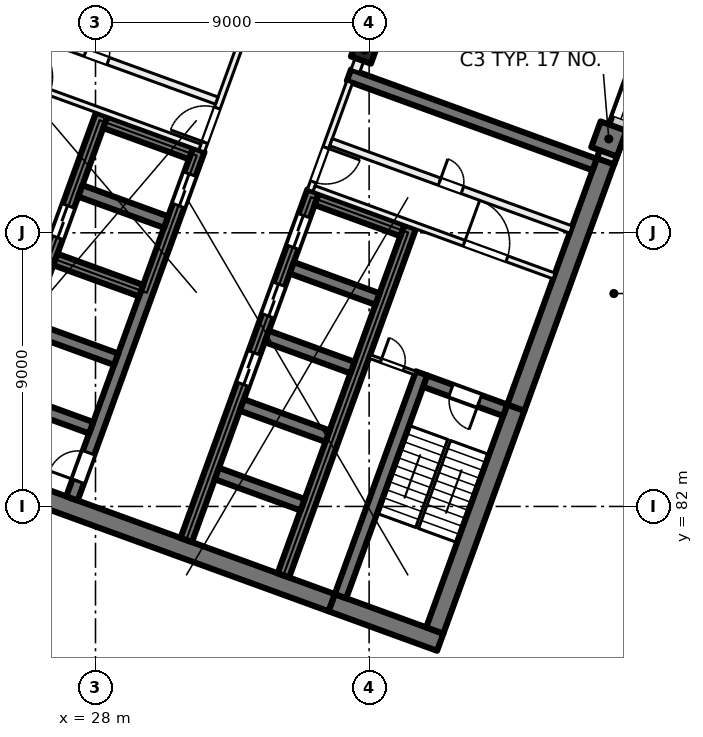
"""IFC4 building model, lengths in metres.
Left out: names, types, materials, properties, quantities, classifications, styles, units other than length and angle.
Written with IfcOpenShell. Run it as: python <this file> out.ifc"""

import sys

from ifc_helpers import new_model, si_unit, direction, frame, frame_2d, origin, origin_2d, place, context, subcontext, project, spatial, rectangle, extrude, element, fill, save


model = new_model("IFC4")
c1 = context("Model", 3, precision=1e-05, world=origin(), true_north=direction((0.0, 1.0)))
c2 = subcontext(c1, "Body", "Model", "MODEL_VIEW")
j1 = project(units=[si_unit("LENGTHUNIT", "METRE"), si_unit("PLANEANGLEUNIT", "RADIAN")], contexts=[c1])
p1 = place(None, origin())
s1 = spatial("IfcSite", under=j1, at=p1, CompositionType="ELEMENT")
p2 = place(p1, origin())
s2 = spatial("IfcBuilding", under=s1, at=p2, CompositionType="ELEMENT")
p3 = place(p2, frame((0.0, 0.0, 47.5)))
s3 = spatial("IfcBuildingStorey", under=s2, at=p3, CompositionType="ELEMENT", Elevation=47.5)
p4 = place(p3, frame((36.849, 97.011, 0.0), z_axis=(0.0, 0.0, 1.0), x_axis=(-0.342020143326, -0.939692620786, 0.0)))
e1 = element("IfcColumn", 1, at=p4, inside=s3, PredefinedType="COLUMN", context=c2, shape_type="SweptSolid", body=[
    extrude(rectangle(XDim=0.7, YDim=0.7, at=origin_2d()), origin(), (0.0, 0.0, 1.0), 4.0),
])
p5 = place(p3, frame((44.884, 94.087, 0.0), z_axis=(0.0, 0.0, 1.0), x_axis=(-0.342020143326, -0.939692620786, 0.0)))
e2 = element("IfcColumn", 2, at=p5, inside=s3, PredefinedType="COLUMN", context=c2, shape_type="SweptSolid", body=[
    extrude(rectangle(XDim=0.9, YDim=0.9, at=origin_2d()), origin(), (0.0, 0.0, 1.0), 4.0),
])
p6 = place(p3, frame((39.338, 77.535, 0.0), z_axis=(0.0, 0.0, 1.0), x_axis=(-0.939701471648, 0.341995824804, 0.0)))
e3 = element("IfcWall", 3, at=p6, inside=s3, PredefinedType="SHEAR", context=c2, shape_type="SweptSolid", body=[
    extrude(rectangle(XDim=3.8, YDim=0.6, at=frame_2d((1.9, 0.0))), origin(), (0.0, 0.0, 1.0), 4.0),
])
p7 = place(p3, frame((35.767, 78.835, 0.0), z_axis=(0.0, 0.0, 1.0), x_axis=(-0.939692894512, 0.342019391267, 0.0)))
e4 = element("IfcWall", 4, at=p7, inside=s3, PredefinedType="SHEAR", context=c2, shape_type="SweptSolid", body=[
    extrude(rectangle(XDim=14.4, YDim=0.6, at=frame_2d((7.2, 0.0))), origin(), (0.0, 0.0, 1.0), 4.0),
])
p8 = place(p3, frame((39.159, 77.92, 0.0), z_axis=(0.0, 0.0, 1.0), x_axis=(0.342016982193, 0.939693771338, 0.0)))
e5 = element("IfcWall", 5, at=p8, inside=s3, PredefinedType="SHEAR", context=c2, shape_type="SweptSolid", body=[
    extrude(rectangle(XDim=7.8, YDim=0.6, at=frame_2d((3.9, 0.0))), origin(), (0.0, 0.0, 1.0), 4.0),
])
p9 = place(p3, frame((41.827, 85.249, 0.0), z_axis=(0.0, 0.0, 1.0), x_axis=(0.342016162452, 0.939694069696, 0.0)))
e6 = element("IfcWall", 6, at=p9, inside=s3, PredefinedType="SHEAR", context=c2, shape_type="SweptSolid", body=[
    extrude(rectangle(XDim=8.9, YDim=0.6, at=frame_2d((4.45, 0.0))), origin(), (0.0, 0.0, 1.0), 4.0),
])
p10 = place(p3, frame((36.058, 79.048, 0.0), z_axis=(0.0, 0.0, 1.0), x_axis=(0.342016982193, 0.939693771338, 0.0)))
e7 = element("IfcWall", 7, at=p10, inside=s3, PredefinedType="SHEAR", context=c2, shape_type="SweptSolid", body=[
    extrude(rectangle(XDim=7.8, YDim=0.4, at=frame_2d((3.9, 0.0))), origin(), (0.0, 0.0, 1.0), 4.0),
])
p11 = place(p3, frame((41.476, 85.164, 0.0), z_axis=(0.0, 0.0, 1.0), x_axis=(-0.939678810556, 0.342058084236, 0.0)))
e8 = element("IfcWall", 8, at=p11, inside=s3, PredefinedType="SHEAR", context=c2, shape_type="SweptSolid", body=[
    extrude(rectangle(XDim=2.8, YDim=0.4, at=frame_2d((1.4, 0.0))), origin(), (0.0, 0.0, 1.0), 4.0),
])
p12 = place(p11, frame((0.9, 0.0, 0.0)))
e9 = element("IfcOpeningElement", 9, at=p12, cuts=e8, PredefinedType="OPENING", context=c2, shape_type="SweptSolid", body=[
    extrude(rectangle(XDim=1.0, YDim=2.1, at=frame_2d((0.5, 1.05))), frame((0.0, 0.21, 0.0), z_axis=(0.0, -1.0, 0.0), x_axis=(1.0, 0.0, 0.0)), (0.0, 0.0, 1.0), 0.42),
])
p13 = place(p3, frame((30.984, 80.895, 0.0), z_axis=(0.0, 0.0, 1.0), x_axis=(0.342021021735, 0.939692301071, 0.0)))
e10 = element("IfcWall", 10, at=p13, inside=s3, PredefinedType="SHEAR", context=c2, shape_type="SweptSolid", body=[
    extrude(rectangle(XDim=12.2, YDim=0.4, at=frame_2d((6.1, 0.0))), origin(), (0.0, 0.0, 1.0), 4.0),
])
p14 = place(p13, frame((5.45, 0.0, 0.0)))
e11 = element("IfcOpeningElement", 11, at=p14, cuts=e10, PredefinedType="OPENING", context=c2, shape_type="SweptSolid", body=[
    extrude(rectangle(XDim=1.1, YDim=2.1, at=frame_2d((0.55, 1.05))), frame((0.0, 0.21, 0.0), z_axis=(0.0, -1.0, 0.0), x_axis=(1.0, 0.0, 0.0)), (0.0, 0.0, 1.0), 0.42),
])
p15 = place(p13, frame((7.85, 0.0, 0.0)))
e12 = element("IfcOpeningElement", 12, at=p15, cuts=e10, PredefinedType="OPENING", context=c2, shape_type="SweptSolid", body=[
    extrude(rectangle(XDim=1.1, YDim=2.1, at=frame_2d((0.55, 1.05))), frame((0.0, 0.21, 0.0), z_axis=(0.0, -1.0, 0.0), x_axis=(1.0, 0.0, 0.0)), (0.0, 0.0, 1.0), 0.42),
])
p16 = place(p13, frame((10.25, 0.0, 0.0)))
e13 = element("IfcOpeningElement", 13, at=p16, cuts=e10, PredefinedType="OPENING", context=c2, shape_type="SweptSolid", body=[
    extrude(rectangle(XDim=1.1, YDim=2.1, at=frame_2d((0.55, 1.05))), frame((0.0, 0.21, 0.0), z_axis=(0.0, -1.0, 0.0), x_axis=(1.0, 0.0, 0.0)), (0.0, 0.0, 1.0), 0.42),
])
p17 = place(p3, frame((34.178, 79.732, 0.0), z_axis=(0.0, 0.0, 1.0), x_axis=(0.342014590177, 0.939694641948, 0.0)))
e14 = element("IfcWall", 14, at=p17, inside=s3, PredefinedType="SHEAR", context=c2, shape_type="SweptSolid", body=[
    extrude(rectangle(XDim=12.2, YDim=0.4, at=frame_2d((6.1, 0.0))), origin(), (0.0, 0.0, 1.0), 4.0),
])
for number, where, z_axis, x_axis in (
    (15, (34.812, 82.056, 0.0), (0.0, 0.0, 1.0), (-0.94, 0.342, 0.0)),
    (16, (35.632, 84.311, 0.0), (0.0, 0.0, 1.0), (-0.94, 0.342, 0.0)),
    (17, (36.453, 86.566, 0.0), (0.0, 0.0, 1.0), (-0.94, 0.342, 0.0)),
    (18, (37.274, 88.822, 0.0), (0.0, 0.0, 1.0), (-0.94, 0.342, 0.0)),
):
    element("IfcWall", number, at=place(p3, frame(where, z_axis=z_axis, x_axis=x_axis)), inside=s3, PredefinedType="SHEAR", context=c2, shape_type="SweptSolid", body=[
        extrude(rectangle(XDim=3.0, YDim=0.4, at=frame_2d((1.5, 0.0))), origin(), (0.0, 0.0, 1.0), 4.0),
    ])
p18 = place(p3, frame((38.095, 91.077, 0.0), z_axis=(0.0, 0.0, 1.0), x_axis=(-0.939676934218, 0.342063238742, 0.0)))
e19 = element("IfcWall", 19, at=p18, inside=s3, PredefinedType="SHEAR", context=c2, shape_type="SweptSolid", body=[
    extrude(rectangle(XDim=3.0, YDim=0.4, at=frame_2d((1.5, 0.0))), origin(), (0.0, 0.0, 1.0), 4.0),
])
p19 = place(p3, frame((27.225, 82.263, 0.0), z_axis=(0.0, 0.0, 1.0), x_axis=(0.342014590177, 0.939694641948, 0.0)))
e20 = element("IfcWall", 20, at=p19, inside=s3, PredefinedType="SHEAR", context=c2, shape_type="SweptSolid", body=[
    extrude(rectangle(XDim=12.2, YDim=0.4, at=frame_2d((6.1, 0.0))), origin(), (0.0, 0.0, 1.0), 4.0),
])
p20 = place(p19, frame((10.25, 0.0, 0.0)))
e21 = element("IfcOpeningElement", 21, at=p20, cuts=e20, PredefinedType="OPENING", context=c2, shape_type="SweptSolid", body=[
    extrude(rectangle(XDim=1.1, YDim=2.1, at=frame_2d((0.55, 1.05))), frame((0.0, 0.21, 0.0), z_axis=(0.0, -1.0, 0.0), x_axis=(1.0, 0.0, 0.0)), (0.0, 0.0, 1.0), 0.42),
])
p21 = place(p19, frame((0.6, 0.0, 0.0)))
e22 = element("IfcOpeningElement", 22, at=p21, cuts=e20, PredefinedType="OPENING", context=c2, shape_type="SweptSolid", body=[
    extrude(rectangle(XDim=1.0, YDim=2.1, at=frame_2d((0.5, 1.05))), frame((0.0, 0.21, 0.0), z_axis=(0.0, -1.0, 0.0), x_axis=(1.0, 0.0, 0.0)), (0.0, 0.0, 1.0), 0.42),
])
p22 = place(p3, frame((24.03, 83.426, 0.0), z_axis=(0.0, 0.0, 1.0), x_axis=(0.342014590177, 0.939694641948, 0.0)))
e23 = element("IfcWall", 23, at=p22, inside=s3, PredefinedType="SHEAR", context=c2, shape_type="SweptSolid", body=[
    extrude(rectangle(XDim=12.2, YDim=0.4, at=frame_2d((6.1, 0.0))), origin(), (0.0, 0.0, 1.0), 4.0),
])
p23 = place(p22, frame((7.9, 0.0, 0.0)))
e24 = element("IfcOpeningElement", 24, at=p23, cuts=e23, PredefinedType="OPENING", context=c2, shape_type="SweptSolid", body=[
    extrude(rectangle(XDim=1.1, YDim=2.1, at=frame_2d((0.55, 1.05))), frame((0.0, 0.21, 0.0), z_axis=(0.0, -1.0, 0.0), x_axis=(1.0, 0.0, 0.0)), (0.0, 0.0, 1.0), 0.42),
])
p24 = place(p3, frame((27.858, 84.587, 0.0), z_axis=(0.0, 0.0, 1.0), x_axis=(-0.939686455819, 0.342037080957, 0.0)))
e25 = element("IfcWall", 25, at=p24, inside=s3, PredefinedType="SHEAR", context=c2, shape_type="SweptSolid", body=[
    extrude(rectangle(XDim=3.0, YDim=0.4, at=frame_2d((1.5, 0.0))), origin(), (0.0, 0.0, 1.0), 4.0),
])
p25 = place(p3, frame((28.678, 86.842, 0.0), z_axis=(0.0, 0.0, 1.0), x_axis=(-0.939676934218, 0.342063238742, 0.0)))
e26 = element("IfcWall", 26, at=p25, inside=s3, PredefinedType="SHEAR", context=c2, shape_type="SweptSolid", body=[
    extrude(rectangle(XDim=3.0, YDim=0.4, at=frame_2d((1.5, 0.0))), origin(), (0.0, 0.0, 1.0), 4.0),
])
for number, where, z_axis, x_axis in (
    (27, (29.5, 89.097, 0.0), (0.0, 0.0, 1.0), (-0.94, 0.342, 0.0)),
    (28, (30.32, 91.353, 0.0), (0.0, 0.0, 1.0), (-0.94, 0.342, 0.0)),
    (29, (31.141, 93.608, 0.0), (0.0, 0.0, 1.0), (-0.94, 0.342, 0.0)),
):
    element("IfcWall", number, at=place(p3, frame(where, z_axis=z_axis, x_axis=x_axis)), inside=s3, PredefinedType="SHEAR", context=c2, shape_type="SweptSolid", body=[
        extrude(rectangle(XDim=3.0, YDim=0.4, at=frame_2d((1.5, 0.0))), origin(), (0.0, 0.0, 1.0), 4.0),
    ])
p26 = place(p3, frame((44.418, 93.245, 0.0), z_axis=(0.0, 0.0, 1.0), x_axis=(-0.93969060187, 0.342025690201, 0.0)))
e30 = element("IfcWall", 30, at=p26, inside=s3, PredefinedType="SHEAR", context=c2, shape_type="SweptSolid", body=[
    extrude(rectangle(XDim=8.6, YDim=0.4, at=frame_2d((4.3, 0.0))), origin(), (0.0, 0.0, 1.0), 4.0),
])
p27 = place(p3, frame((52.212, 113.783, 0.0), z_axis=(0.0, 0.0, 1.0), x_axis=(-0.34202521188, -0.939690775968, 0.0)))
e31 = element("IfcWall", 31, at=p27, inside=s3, PredefinedType="SOLIDWALL", context=c2, shape_type="SweptSolid", body=[
    extrude(rectangle(XDim=21.745, YDim=0.6, at=frame_2d((10.873, 0.0))), origin(), (0.0, 0.0, 1.0), 3.625),
])
p28 = place(p27, frame((3.765, 0.0, 0.9)))
e32 = element("IfcOpeningElement", 32, at=p28, cuts=e31, PredefinedType="OPENING", context=c2, shape_type="SweptSolid", body=[
    extrude(rectangle(XDim=3.0, YDim=2.4, at=frame_2d((1.5, 1.2))), frame((0.0, 0.31, 0.0), z_axis=(0.0, -1.0, 0.0), x_axis=(1.0, 0.0, 0.0)), (0.0, 0.0, 1.0), 0.62),
])
p29 = place(p27, frame((8.265, 0.0, 0.9)))
e33 = element("IfcOpeningElement", 33, at=p29, cuts=e31, PredefinedType="OPENING", context=c2, shape_type="SweptSolid", body=[
    extrude(rectangle(XDim=3.0, YDim=2.4, at=frame_2d((1.5, 1.2))), frame((0.0, 0.31, 0.0), z_axis=(0.0, -1.0, 0.0), x_axis=(1.0, 0.0, 0.0)), (0.0, 0.0, 1.0), 0.62),
])
p30 = place(p27, frame((12.765, 0.0, 0.9)))
e34 = element("IfcOpeningElement", 34, at=p30, cuts=e31, PredefinedType="OPENING", context=c2, shape_type="SweptSolid", body=[
    extrude(rectangle(XDim=3.0, YDim=2.4, at=frame_2d((1.5, 1.2))), frame((0.0, 0.31, 0.0), z_axis=(0.0, -1.0, 0.0), x_axis=(1.0, 0.0, 0.0)), (0.0, 0.0, 1.0), 0.62),
])
p31 = place(p27, frame((17.265, 0.0, 0.9)))
e35 = element("IfcOpeningElement", 35, at=p31, cuts=e31, PredefinedType="OPENING", context=c2, shape_type="SweptSolid", body=[
    extrude(rectangle(XDim=3.0, YDim=2.4, at=frame_2d((1.5, 1.2))), frame((0.0, 0.31, 0.0), z_axis=(0.0, -1.0, 0.0), x_axis=(1.0, 0.0, 0.0)), (0.0, 0.0, 1.0), 0.62),
])
p32 = place(p3, frame((31.491, 93.693, 0.0), z_axis=(0.0, 0.0, 1.0), x_axis=(0.341995824804, 0.939701471648, 0.0)))
e36 = element("IfcWall", 36, at=p32, inside=s3, PredefinedType="PARTITIONING", context=c2, shape_type="SweptSolid", body=[
    extrude(rectangle(XDim=3.8, YDim=0.2, at=frame_2d((1.9, 0.0))), origin(), (0.0, 0.0, 1.0), 3.625),
])
p33 = place(p32, frame((0.3, 0.0, 0.0)))
e37 = element("IfcOpeningElement", 37, at=p33, cuts=e36, PredefinedType="OPENING", context=c2, shape_type="SweptSolid", body=[
    extrude(rectangle(XDim=1.2, YDim=2.1, at=frame_2d((0.6, 1.05))), frame((0.0, 0.11, 0.0), z_axis=(0.0, -1.0, 0.0), x_axis=(1.0, 0.0, 0.0)), (0.0, 0.0, 1.0), 0.22),
])
p34 = place(p3, frame((23.538, 96.694, 0.0), z_axis=(0.0, 0.0, 1.0), x_axis=(0.939691552312, -0.342023078919, 0.0)))
e38 = element("IfcWall", 38, at=p34, inside=s3, PredefinedType="PARTITIONING", context=c2, shape_type="SweptSolid", body=[
    extrude(rectangle(XDim=8.4, YDim=0.2, at=frame_2d((4.2, 0.0))), origin(), (0.0, 0.0, 1.0), 3.625),
])
p35 = place(p34, frame((1.65, 0.0, 0.0)))
e39 = element("IfcOpeningElement", 39, at=p35, cuts=e38, PredefinedType="OPENING", context=c2, shape_type="SweptSolid", body=[
    extrude(rectangle(XDim=1.5, YDim=2.1, at=frame_2d((0.75, 1.05))), frame((0.0, 0.11, 0.0), z_axis=(0.0, -1.0, 0.0), x_axis=(1.0, 0.0, 0.0)), (0.0, 0.0, 1.0), 0.22),
])
p36 = place(p3, frame((24.094, 98.221, 0.0), z_axis=(0.0, 0.0, 1.0), x_axis=(0.939691552312, -0.342023078919, 0.0)))
e40 = element("IfcWall", 40, at=p36, inside=s3, PredefinedType="PARTITIONING", context=c2, shape_type="SweptSolid", body=[
    extrude(rectangle(XDim=8.4, YDim=0.25, at=frame_2d((4.2, 0.0))), origin(), (0.0, 0.0, 1.0), 3.625),
])
p37 = place(p36, frame((3.8, 0.0, 0.0)))
e41 = element("IfcOpeningElement", 41, at=p37, cuts=e40, PredefinedType="OPENING", context=c2, shape_type="SweptSolid", body=[
    extrude(rectangle(XDim=0.8, YDim=2.1, at=frame_2d((0.4, 1.05))), frame((0.0, 0.135, 0.0), z_axis=(0.0, -1.0, 0.0), x_axis=(1.0, 0.0, 0.0)), (0.0, 0.0, 1.0), 0.27),
])
p38 = place(p3, frame((36.362, 95.964, 0.0), z_axis=(0.0, 0.0, 1.0), x_axis=(-0.341995824804, -0.939701471648, 0.0)))
e42 = element("IfcWall", 42, at=p38, inside=s3, PredefinedType="PARTITIONING", context=c2, shape_type="SweptSolid", body=[
    extrude(rectangle(XDim=3.8, YDim=0.2, at=frame_2d((1.9, 0.0))), origin(), (0.0, 0.0, 1.0), 3.625),
])
p39 = place(p38, frame((2.3, 0.0, 0.0)))
e43 = element("IfcOpeningElement", 43, at=p39, cuts=e42, PredefinedType="OPENING", context=c2, shape_type="SweptSolid", body=[
    extrude(rectangle(XDim=1.2, YDim=2.1, at=frame_2d((0.6, 1.05))), frame((0.0, 0.11, 0.0), z_axis=(0.0, -1.0, 0.0), x_axis=(1.0, 0.0, 0.0)), (0.0, 0.0, 1.0), 0.22),
])
p40 = place(p3, frame((35.19, 92.453, 0.0), z_axis=(0.0, 0.0, 1.0), x_axis=(0.939691552312, -0.342023078919, 0.0)))
e44 = element("IfcWall", 44, at=p40, inside=s3, PredefinedType="PARTITIONING", context=c2, shape_type="SweptSolid", body=[
    extrude(rectangle(XDim=8.4, YDim=0.2, at=frame_2d((4.2, 0.0))), origin(), (0.0, 0.0, 1.0), 3.625),
])
p41 = place(p40, frame((5.25, 0.0, 0.0)))
e45 = element("IfcOpeningElement", 45, at=p41, cuts=e44, PredefinedType="OPENING", context=c2, shape_type="SweptSolid", body=[
    extrude(rectangle(XDim=1.5, YDim=2.1, at=frame_2d((0.75, 1.05))), frame((0.0, 0.11, 0.0), z_axis=(0.0, -1.0, 0.0), x_axis=(1.0, 0.0, 0.0)), (0.0, 0.0, 1.0), 0.22),
])
p42 = place(p3, frame((35.746, 93.98, 0.0), z_axis=(0.0, 0.0, 1.0), x_axis=(0.939691552312, -0.342023078919, 0.0)))
e46 = element("IfcWall", 46, at=p42, inside=s3, PredefinedType="PARTITIONING", context=c2, shape_type="SweptSolid", body=[
    extrude(rectangle(XDim=8.4, YDim=0.25, at=frame_2d((4.2, 0.0))), origin(), (0.0, 0.0, 1.0), 3.625),
])
p43 = place(p42, frame((3.8, 0.0, 0.0)))
e47 = element("IfcOpeningElement", 47, at=p43, cuts=e46, PredefinedType="OPENING", context=c2, shape_type="SweptSolid", body=[
    extrude(rectangle(XDim=0.8, YDim=2.1, at=frame_2d((0.4, 1.05))), frame((0.0, 0.135, 0.0), z_axis=(0.0, -1.0, 0.0), x_axis=(1.0, 0.0, 0.0)), (0.0, 0.0, 1.0), 0.27),
])
p44 = place(p3, frame((37.013, 86.935, 0.0), z_axis=(0.0, 0.0, 1.0), x_axis=(0.939659694648, -0.342110593602, 0.0)))
e48 = element("IfcWall", 48, at=p44, inside=s3, PredefinedType="PARTITIONING", context=c2, shape_type="SweptSolid", body=[
    extrude(rectangle(XDim=1.6, YDim=0.125, at=frame_2d((0.8, 0.0))), origin(), (0.0, 0.0, 1.0), 3.625),
])
p45 = place(p44, frame((0.4, 0.0, 0.0)))
e49 = element("IfcOpeningElement", 49, at=p45, cuts=e48, PredefinedType="OPENING", context=c2, shape_type="SweptSolid", body=[
    extrude(rectangle(XDim=0.8, YDim=2.1, at=frame_2d((0.4, 1.05))), frame((0.0, 0.073, 0.0), z_axis=(0.0, -1.0, 0.0), x_axis=(1.0, 0.0, 0.0)), (0.0, 0.0, 1.0), 0.145),
])
p46 = place(p3, frame((47.314, 125.909, 0.0), z_axis=(0.0, 0.0, 1.0), x_axis=(-0.342010770371, -0.939696032209, 0.0)))
e50 = element("IfcWall", 50, at=p46, inside=s3, PredefinedType="PARTITIONING", context=c2, shape_type="SweptSolid", body=[
    extrude(rectangle(XDim=31.485, YDim=0.3, at=frame_2d((15.742, 0.0))), origin(), (0.0, 0.0, 1.0), 3.625),
])
p47 = place(p46, frame((22.21, 0.0, 0.0)))
e51 = element("IfcOpeningElement", 51, at=p47, cuts=e50, PredefinedType="OPENING", context=c2, shape_type="SweptSolid", body=[
    extrude(rectangle(XDim=1.8, YDim=2.1, at=frame_2d((0.9, 1.05))), frame((0.0, 0.16, 0.0), z_axis=(0.0, -1.0, 0.0), x_axis=(1.0, 0.0, 0.0)), (0.0, 0.0, 1.0), 0.32),
])
p48 = place(p46, frame((9.985, 0.0, 0.0)))
e52 = element("IfcOpeningElement", 52, at=p48, cuts=e50, PredefinedType="OPENING", context=c2, shape_type="SweptSolid", body=[
    extrude(rectangle(XDim=1.0, YDim=2.1, at=frame_2d((0.5, 1.05))), frame((0.0, 0.16, 0.0), z_axis=(0.0, -1.0, 0.0), x_axis=(1.0, 0.0, 0.0)), (0.0, 0.0, 1.0), 0.32),
])
p49 = place(p46, frame((5.484, 0.0, 0.0)))
e53 = element("IfcOpeningElement", 53, at=p49, cuts=e50, PredefinedType="OPENING", context=c2, shape_type="SweptSolid", body=[
    extrude(rectangle(XDim=1.0, YDim=2.1, at=frame_2d((0.5, 1.05))), frame((0.0, 0.16, 0.0), z_axis=(0.0, -1.0, 0.0), x_axis=(1.0, 0.0, 0.0)), (0.0, 0.0, 1.0), 0.32),
])
p50 = place(p31, origin())
e54 = element("IfcWindow", 54, at=p50, inside=s3, PartitioningType="SINGLE_PANEL", PredefinedType="WINDOW", context=c2, shape_type="SweptSolid", body=[
    extrude(rectangle(XDim=3.0, YDim=2.4, at=frame_2d((1.5, 1.2))), frame((0.0, 0.03, 0.0), z_axis=(0.0, -1.0, 0.0), x_axis=(1.0, 0.0, 0.0)), (0.0, 0.0, 1.0), 0.06),
])
fill(e35, e54)
p51 = place(p20, origin())
e55 = element("IfcDoor", 55, at=p51, inside=s3, OperationType="DOUBLE_DOOR_SLIDING", PredefinedType="DOOR", context=c2, shape_type="SweptSolid", body=[
    extrude(rectangle(XDim=1.1, YDim=2.1, at=frame_2d((0.55, 1.05))), frame((0.0, 0.025, 0.0), z_axis=(0.0, -1.0, 0.0), x_axis=(1.0, 0.0, 0.0)), (0.0, 0.0, 1.0), 0.05),
])
fill(e21, e55)
p52 = place(p14, origin())
e56 = element("IfcDoor", 56, at=p52, inside=s3, OperationType="DOUBLE_DOOR_SLIDING", PredefinedType="DOOR", context=c2, shape_type="SweptSolid", body=[
    extrude(rectangle(XDim=1.1, YDim=2.1, at=frame_2d((0.55, 1.05))), frame((0.0, 0.025, 0.0), z_axis=(0.0, -1.0, 0.0), x_axis=(1.0, 0.0, 0.0)), (0.0, 0.0, 1.0), 0.05),
])
fill(e11, e56)
p53 = place(p15, origin())
e57 = element("IfcDoor", 57, at=p53, inside=s3, OperationType="DOUBLE_DOOR_SLIDING", PredefinedType="DOOR", context=c2, shape_type="SweptSolid", body=[
    extrude(rectangle(XDim=1.1, YDim=2.1, at=frame_2d((0.55, 1.05))), frame((0.0, 0.025, 0.0), z_axis=(0.0, -1.0, 0.0), x_axis=(1.0, 0.0, 0.0)), (0.0, 0.0, 1.0), 0.05),
])
fill(e12, e57)
p54 = place(p16, origin())
e58 = element("IfcDoor", 58, at=p54, inside=s3, OperationType="DOUBLE_DOOR_SLIDING", PredefinedType="DOOR", context=c2, shape_type="SweptSolid", body=[
    extrude(rectangle(XDim=1.1, YDim=2.1, at=frame_2d((0.55, 1.05))), frame((0.0, 0.025, 0.0), z_axis=(0.0, -1.0, 0.0), x_axis=(1.0, 0.0, 0.0)), (0.0, 0.0, 1.0), 0.05),
])
fill(e13, e58)
p55 = place(p21, origin())
e59 = element("IfcDoor", 59, at=p55, inside=s3, OperationType="SINGLE_SWING_LEFT", PredefinedType="DOOR", context=c2, shape_type="SweptSolid", body=[
    extrude(rectangle(XDim=1.0, YDim=2.1, at=frame_2d((0.5, 1.05))), frame((0.0, 0.025, 0.0), z_axis=(0.0, -1.0, 0.0), x_axis=(1.0, 0.0, 0.0)), (0.0, 0.0, 1.0), 0.05),
])
fill(e22, e59)
p56 = place(p33, origin())
e60 = element("IfcDoor", 60, at=p56, inside=s3, OperationType="DOUBLE_DOOR_SINGLE_SWING", PredefinedType="DOOR", context=c2, shape_type="SweptSolid", body=[
    extrude(rectangle(XDim=1.2, YDim=2.1, at=frame_2d((0.6, 1.05))), frame((0.0, 0.025, 0.0), z_axis=(0.0, -1.0, 0.0), x_axis=(1.0, 0.0, 0.0)), (0.0, 0.0, 1.0), 0.05),
])
fill(e37, e60)
p57 = place(p37, origin())
e61 = element("IfcDoor", 61, at=p57, inside=s3, OperationType="SINGLE_SWING_LEFT", PredefinedType="DOOR", context=c2, shape_type="SweptSolid", body=[
    extrude(rectangle(XDim=0.8, YDim=2.1, at=frame_2d((0.4, 1.05))), frame((0.0, 0.025, 0.0), z_axis=(0.0, -1.0, 0.0), x_axis=(1.0, 0.0, 0.0)), (0.0, 0.0, 1.0), 0.05),
])
fill(e41, e61)
p58 = place(p39, origin())
e62 = element("IfcDoor", 62, at=p58, inside=s3, OperationType="DOUBLE_DOOR_SINGLE_SWING", PredefinedType="DOOR", context=c2, shape_type="SweptSolid", body=[
    extrude(rectangle(XDim=1.2, YDim=2.1, at=frame_2d((0.6, 1.05))), frame((0.0, 0.025, 0.0), z_axis=(0.0, -1.0, 0.0), x_axis=(1.0, 0.0, 0.0)), (0.0, 0.0, 1.0), 0.05),
])
fill(e43, e62)
p59 = place(p41, origin())
e63 = element("IfcDoor", 63, at=p59, inside=s3, OperationType="DOUBLE_DOOR_SINGLE_SWING", PredefinedType="DOOR", context=c2, shape_type="SweptSolid", body=[
    extrude(rectangle(XDim=1.5, YDim=2.1, at=frame_2d((0.75, 1.05))), frame((0.0, 0.025, 0.0), z_axis=(0.0, -1.0, 0.0), x_axis=(1.0, 0.0, 0.0)), (0.0, 0.0, 1.0), 0.05),
])
fill(e45, e63)
p60 = place(p12, origin())
e64 = element("IfcDoor", 64, at=p60, inside=s3, OperationType="SINGLE_SWING_RIGHT", PredefinedType="DOOR", context=c2, shape_type="SweptSolid", body=[
    extrude(rectangle(XDim=1.0, YDim=2.1, at=frame_2d((0.5, 1.05))), frame((0.0, 0.025, 0.0), z_axis=(0.0, -1.0, 0.0), x_axis=(1.0, 0.0, 0.0)), (0.0, 0.0, 1.0), 0.05),
])
fill(e9, e64)
p61 = place(p45, origin())
e65 = element("IfcDoor", 65, at=p61, inside=s3, OperationType="SINGLE_SWING_LEFT", PredefinedType="DOOR", context=c2, shape_type="SweptSolid", body=[
    extrude(rectangle(XDim=0.8, YDim=2.1, at=frame_2d((0.4, 1.05))), frame((0.0, 0.025, 0.0), z_axis=(0.0, -1.0, 0.0), x_axis=(1.0, 0.0, 0.0)), (0.0, 0.0, 1.0), 0.05),
])
fill(e49, e65)
p62 = place(p43, origin())
e66 = element("IfcDoor", 66, at=p62, inside=s3, OperationType="SINGLE_SWING_RIGHT", PredefinedType="DOOR", context=c2, shape_type="SweptSolid", body=[
    extrude(rectangle(XDim=0.8, YDim=2.1, at=frame_2d((0.4, 1.05))), frame((0.0, 0.025, 0.0), z_axis=(0.0, -1.0, 0.0), x_axis=(1.0, 0.0, 0.0)), (0.0, 0.0, 1.0), 0.05),
])
fill(e47, e66)
p63 = place(p23, origin())
e67 = element("IfcDoor", 67, at=p63, inside=s3, OperationType="DOUBLE_DOOR_SLIDING", PredefinedType="DOOR", context=c2, shape_type="SweptSolid", body=[
    extrude(rectangle(XDim=1.1, YDim=2.1, at=frame_2d((0.55, 1.05))), frame((0.0, 0.025, 0.0), z_axis=(0.0, -1.0, 0.0), x_axis=(1.0, 0.0, 0.0)), (0.0, 0.0, 1.0), 0.05),
])
fill(e24, e67)
save(model, sys.argv[1])
